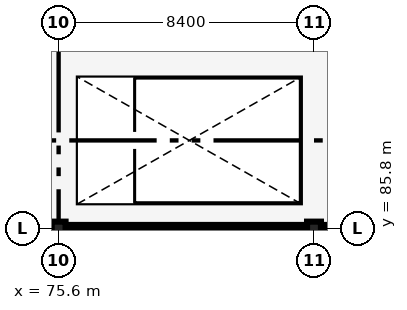
"""IFC4 building model, lengths in metres.
Left out: names, types, materials, properties, quantities, classifications, styles, units other than length and angle.
Written with IfcOpenShell. Run it as: python <this file> out.ifc"""

import sys

from ifc_helpers import new_model, si_unit, direction, frame, frame_2d, origin, origin_2d, place, context, subcontext, project, spatial, rectangle, hollow_circle, extrude, element, save


model = new_model("IFC4")
c1 = context("Model", 3, precision=1e-05, world=origin(), true_north=direction((0.0, 1.0)))
c2 = subcontext(c1, "Body", "Model", "MODEL_VIEW")
j1 = project(units=[si_unit("LENGTHUNIT", "METRE"), si_unit("PLANEANGLEUNIT", "RADIAN")], contexts=[c1])
p1 = place(None, origin())
s1 = spatial("IfcSite", under=j1, at=p1, CompositionType="ELEMENT")
p2 = place(p1, origin())
s2 = spatial("IfcBuilding", under=s1, at=p2, CompositionType="ELEMENT")
p3 = place(p2, frame((0.0, 0.0, 4.8)))
s3 = spatial("IfcBuildingStorey", under=s2, at=p3, CompositionType="ELEMENT", Elevation=4.8)
for number, where, z_axis, x_axis in (
    (1, (75.6, 85.8, 0.0), (0.0, 0.0, 1.0), (1.0, 0.0, 0.0)),
    (2, (84.0, 85.8, 0.0), (0.0, 0.0, 1.0), (1.0, 0.0, 0.0)),
):
    element("IfcColumn", number, at=place(p3, frame(where, z_axis=z_axis, x_axis=x_axis)), inside=s3, PredefinedType="USERDEFINED", context=c2, shape_type="SweptSolid", body=[
        extrude(hollow_circle(Radius=0.229, WallThickness=0.013, at=origin_2d()), origin(), (0.0, 0.0, 1.0), 4.2),
    ])
p4 = place(p3, frame((67.475, 85.8, 0.0), z_axis=(0.0, 0.0, 1.0), x_axis=(1.0, 0.0, 0.0)))
e3 = element("IfcWall", 3, at=p4, inside=s3, PredefinedType="SOLIDWALL", context=c2, shape_type="SweptSolid", body=[
    extrude(rectangle(XDim=7.921, YDim=0.24, at=frame_2d((3.961, 0.0))), origin(), (0.0, 0.0, 1.0), 1.1),
])
p5 = place(p3, frame((75.804, 85.8, 0.0), z_axis=(0.0, 0.0, 1.0), x_axis=(1.0, 0.0, 0.0)))
e4 = element("IfcWall", 4, at=p5, inside=s3, PredefinedType="SOLIDWALL", context=c2, shape_type="SweptSolid", body=[
    extrude(rectangle(XDim=7.993, YDim=0.24, at=frame_2d((3.996, 0.0))), origin(), (0.0, 0.0, 1.0), 1.1),
])
p6 = place(p3, frame((84.204, 85.8, 0.0), z_axis=(0.0, 0.0, 1.0), x_axis=(1.0, 0.0, 0.0)))
e5 = element("IfcWall", 5, at=p6, inside=s3, PredefinedType="SOLIDWALL", context=c2, shape_type="SweptSolid", body=[
    extrude(rectangle(XDim=7.896, YDim=0.24, at=frame_2d((3.948, 0.0))), origin(), (0.0, 0.0, 1.0), 1.1),
])
save(model, sys.argv[1])
